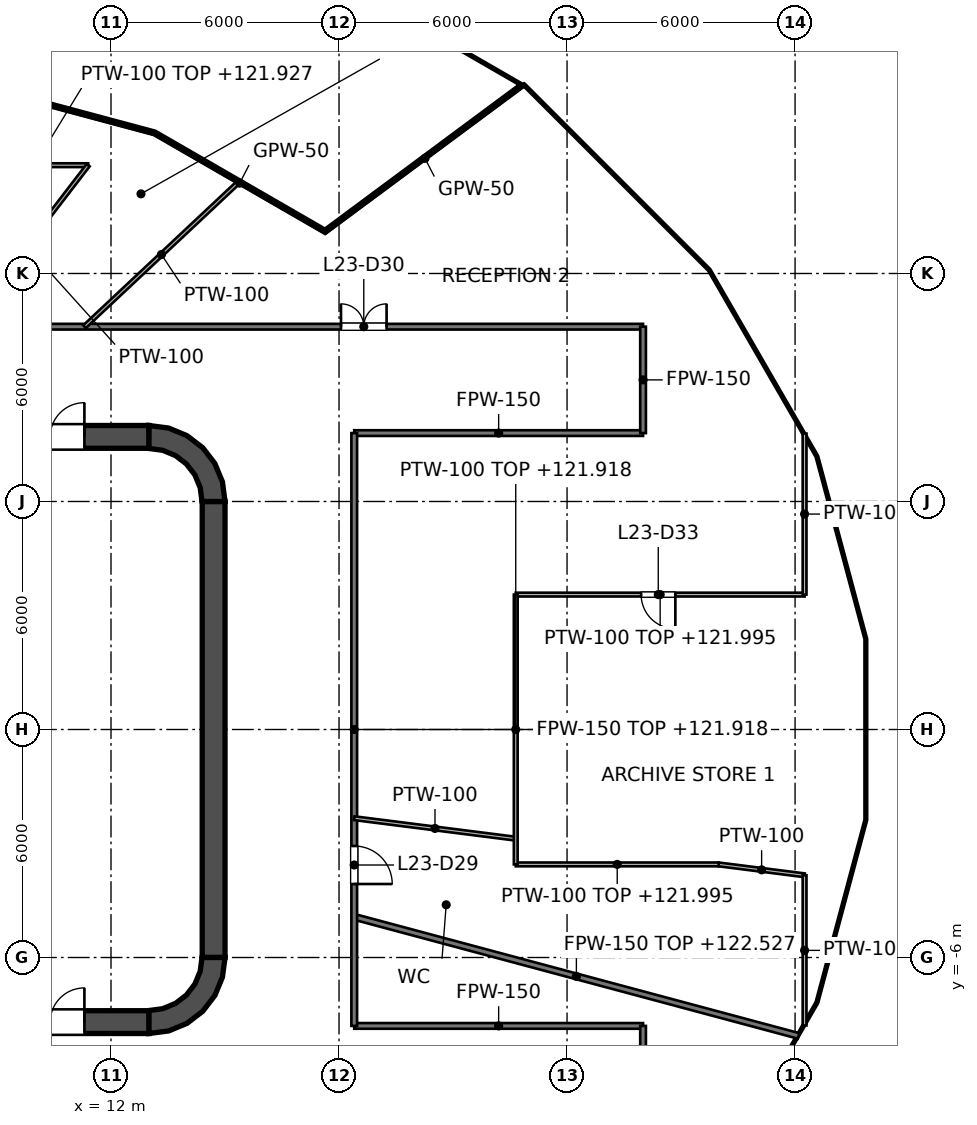
"""IFC4 building model, lengths in metres.
Left out: names, types, materials, properties, quantities, classifications, styles, units other than length and angle.
Written with IfcOpenShell. Run it as: python <this file> out.ifc"""

import sys

from ifc_helpers import new_model, si_unit, direction, frame, frame_2d, origin, place, context, subcontext, project, spatial, polyline, rectangle, outline, extrude, element, fill, save


model = new_model("IFC4")
c1 = context("Model", 3, precision=1e-05, world=origin(), true_north=direction((0.0, 1.0)))
c2 = subcontext(c1, "Body", "Model", "MODEL_VIEW")
j1 = project(units=[si_unit("LENGTHUNIT", "METRE"), si_unit("PLANEANGLEUNIT", "RADIAN")], contexts=[c1])
p1 = place(None, origin())
s1 = spatial("IfcSite", under=j1, at=p1, CompositionType="ELEMENT")
p2 = place(p1, origin())
s2 = spatial("IfcBuilding", under=s1, at=p2, CompositionType="ELEMENT")
p3 = place(p2, frame((0.0, 0.0, 118.8)))
s3 = spatial("IfcBuildingStorey", under=s2, at=p3, CompositionType="ELEMENT", Elevation=118.8)
p4 = place(p3, frame((-13.0, 7.7, 0.0), z_axis=(0.0, 0.0, 1.0), x_axis=(1.0, 0.0, 0.0)))
e1 = element("IfcWall", 1, at=p4, inside=s3, PredefinedType="SHEAR", context=c2, shape_type="SweptSolid", body=[
    extrude(rectangle(XDim=26.0, YDim=0.6, at=frame_2d((13.0, 0.0))), origin(), (0.0, 0.0, 1.0), 4.2),
])
p5 = place(p4, frame((1.7, 0.0, 0.0)))
e2 = element("IfcOpeningElement", 2, at=p5, cuts=e1, PredefinedType="OPENING", context=c2, shape_type="SweptSolid", body=[
    extrude(rectangle(XDim=1.8, YDim=2.1, at=frame_2d((0.9, 1.05))), frame((0.0, 0.3, 0.0), z_axis=(0.0, -1.0, 0.0), x_axis=(1.0, 0.0, 0.0)), (0.0, 0.0, 1.0), 0.6),
])
p6 = place(p4, frame((22.5, 0.0, 0.0)))
e3 = element("IfcOpeningElement", 3, at=p6, cuts=e1, PredefinedType="OPENING", context=c2, shape_type="SweptSolid", body=[
    extrude(rectangle(XDim=1.8, YDim=2.1, at=frame_2d((0.9, 1.05))), frame((0.0, 0.3, 0.0), z_axis=(0.0, -1.0, 0.0), x_axis=(1.0, 0.0, 0.0)), (0.0, 0.0, 1.0), 0.6),
])
p7 = place(p3, frame((-13.0, -7.7, 0.0), z_axis=(0.0, 0.0, 1.0), x_axis=(1.0, 0.0, 0.0)))
e4 = element("IfcWall", 4, at=p7, inside=s3, PredefinedType="SHEAR", context=c2, shape_type="SweptSolid", body=[
    extrude(rectangle(XDim=26.0, YDim=0.6, at=frame_2d((13.0, 0.0))), origin(), (0.0, 0.0, 1.0), 4.2),
])
p8 = place(p7, frame((1.7, 0.0, 0.0)))
e5 = element("IfcOpeningElement", 5, at=p8, cuts=e4, PredefinedType="OPENING", context=c2, shape_type="SweptSolid", body=[
    extrude(rectangle(XDim=1.8, YDim=2.1, at=frame_2d((0.9, 1.05))), frame((0.0, 0.3, 0.0), z_axis=(0.0, -1.0, 0.0), x_axis=(1.0, 0.0, 0.0)), (0.0, 0.0, 1.0), 0.6),
])
p9 = place(p7, frame((22.5, 0.0, 0.0)))
e6 = element("IfcOpeningElement", 6, at=p9, cuts=e4, PredefinedType="OPENING", context=c2, shape_type="SweptSolid", body=[
    extrude(rectangle(XDim=1.8, YDim=2.1, at=frame_2d((0.9, 1.05))), frame((0.0, 0.3, 0.0), z_axis=(0.0, -1.0, 0.0), x_axis=(1.0, 0.0, 0.0)), (0.0, 0.0, 1.0), 0.6),
])
p10 = place(p3, frame((14.7, -6.0, 0.0), z_axis=(0.0, 0.0, 1.0), x_axis=(0.0, 1.0, 0.0)))
e7 = element("IfcWall", 7, at=p10, inside=s3, PredefinedType="SHEAR", context=c2, shape_type="SweptSolid", body=[
    extrude(rectangle(XDim=12.0, YDim=0.6, at=frame_2d((6.0, 0.0))), origin(), (0.0, 0.0, 1.0), 4.2),
])
p11 = place(p3, origin())
e8 = element("IfcWall", 8, at=p11, inside=s3, PredefinedType="SHEAR", context=c2, shape_type="SweptSolid", body=[
    extrude(outline(polyline([(13.0, 8.0), (13.0, 7.395), (13.361, 7.347), (13.698, 7.208), (13.986, 6.986), (14.208, 6.698), (14.347, 6.361), (14.395, 6.0), (15.0, 6.0), (14.932, 6.518), (14.732, 7.0), (14.414, 7.414), (14.0, 7.732), (13.518, 7.932), (13.0, 8.0)])), origin(), (0.0, 0.0, 1.0), 4.2),
])
e9 = element("IfcWall", 9, at=p11, inside=s3, PredefinedType="SHEAR", context=c2, shape_type="SweptSolid", body=[
    extrude(outline(polyline([(15.0, -6.0), (14.395, -6.0), (14.347, -6.361), (14.208, -6.698), (13.986, -6.986), (13.698, -7.208), (13.361, -7.347), (13.0, -7.395), (13.0, -8.0), (13.518, -7.932), (14.0, -7.732), (14.414, -7.414), (14.732, -7.0), (14.932, -6.518), (15.0, -6.0)])), origin(), (0.0, 0.0, 1.0), 4.2),
])
p12 = place(p3, frame((11.8, -7.4, 0.0), z_axis=(0.0, 0.0, 1.0), x_axis=(0.0, 1.0, 0.0)))
e10 = element("IfcWall", 10, at=p12, inside=s3, PredefinedType="SOLIDWALL", context=c2, shape_type="SweptSolid", body=[
    extrude(rectangle(XDim=14.8, YDim=0.4, at=frame_2d((7.4, 0.0))), origin(), (0.0, 0.0, 1.0), 4.05),
])
p13 = place(p12, frame((11.2, 0.0, 0.0)))
e11 = element("IfcOpeningElement", 11, at=p13, cuts=e10, PredefinedType="OPENING", context=c2, shape_type="SweptSolid", body=[
    extrude(rectangle(XDim=1.1, YDim=2.1, at=frame_2d((0.55, 1.05))), frame((0.0, 0.2, 0.0), z_axis=(0.0, -1.0, 0.0), x_axis=(1.0, 0.0, 0.0)), (0.0, 0.0, 1.0), 0.4),
])
p14 = place(p12, frame((8.3, 0.0, 0.0)))
e12 = element("IfcOpeningElement", 12, at=p14, cuts=e10, PredefinedType="OPENING", context=c2, shape_type="SweptSolid", body=[
    extrude(rectangle(XDim=1.1, YDim=2.1, at=frame_2d((0.55, 1.05))), frame((0.0, 0.2, 0.0), z_axis=(0.0, -1.0, 0.0), x_axis=(1.0, 0.0, 0.0)), (0.0, 0.0, 1.0), 0.4),
])
p15 = place(p12, frame((5.4, 0.0, 0.0)))
e13 = element("IfcOpeningElement", 13, at=p15, cuts=e10, PredefinedType="OPENING", context=c2, shape_type="SweptSolid", body=[
    extrude(rectangle(XDim=1.1, YDim=2.1, at=frame_2d((0.55, 1.05))), frame((0.0, 0.2, 0.0), z_axis=(0.0, -1.0, 0.0), x_axis=(1.0, 0.0, 0.0)), (0.0, 0.0, 1.0), 0.4),
])
p16 = place(p12, frame((13.552, 0.0, 0.0)))
e14 = element("IfcOpeningElement", 14, at=p16, cuts=e10, PredefinedType="OPENING", context=c2, shape_type="SweptSolid", body=[
    extrude(rectangle(XDim=0.9, YDim=2.1, at=frame_2d((0.45, 1.05))), frame((0.0, 0.2, 0.0), z_axis=(0.0, -1.0, 0.0), x_axis=(1.0, 0.0, 0.0)), (0.0, 0.0, 1.0), 0.4),
])
p17 = place(p12, frame((0.347, 0.0, 0.0)))
e15 = element("IfcOpeningElement", 15, at=p17, cuts=e10, PredefinedType="OPENING", context=c2, shape_type="SweptSolid", body=[
    extrude(rectangle(XDim=0.9, YDim=2.1, at=frame_2d((0.45, 1.05))), frame((0.0, 0.2, 0.0), z_axis=(0.0, -1.0, 0.0), x_axis=(1.0, 0.0, 0.0)), (0.0, 0.0, 1.0), 0.4),
])
e16 = element("IfcWall", 16, at=p11, inside=s3, PredefinedType="SOLIDWALL", context=c2, shape_type="SweptSolid", body=[
    extrude(outline(polyline([(12.0, -5.675), (12.0, -5.925), (14.15, -5.925), (14.4, -5.925), (14.4, -5.675), (14.4, -3.025), (14.4, -2.775), (14.4, -0.125), (14.4, 0.125), (14.4, 2.775), (14.4, 3.025), (14.4, 5.675), (14.4, 5.925), (14.15, 5.925), (12.0, 5.925), (12.0, 5.675), (14.15, 5.675), (14.15, 3.025), (12.0, 3.025), (12.0, 2.775), (14.15, 2.775), (14.15, 0.125), (12.0, 0.125), (12.0, -0.125), (14.15, -0.125), (14.15, -2.775), (12.0, -2.775), (12.0, -3.025), (14.15, -3.025), (14.15, -5.675), (12.0, -5.675)])), origin(), (0.0, 0.0, 1.0), 4.05),
])
p18 = place(p3, frame((18.4, -4.93, 0.0), z_axis=(0.0, 0.0, 1.0), x_axis=(0.965917167339, -0.258851358583, 0.0)))
e17 = element("IfcWall", 17, at=p18, inside=s3, PredefinedType="PARTITIONING", context=c2, shape_type="SweptSolid", body=[
    extrude(rectangle(XDim=12.104, YDim=0.15, at=frame_2d((6.052, 0.0))), origin(), (0.0, 0.0, 1.0), 3.727),
])
for number, where, z_axis, x_axis in (
    (18, (18.4, -7.8, 0.0), (0.0, 0.0, 1.0), (1.0, 0.0, 0.0)),
    (19, (18.4, 7.8, 0.0), (0.0, 0.0, 1.0), (1.0, 0.0, 0.0)),
):
    element("IfcWall", number, at=place(p3, frame(where, z_axis=z_axis, x_axis=x_axis)), inside=s3, PredefinedType="PARTITIONING", context=c2, shape_type="SweptSolid", body=[
        extrude(rectangle(XDim=7.6, YDim=0.15, at=frame_2d((3.8, 0.0))), origin(), (0.0, 0.0, 1.0), 3.276),
    ])
p19 = place(p3, frame((-26.0, 10.6, 0.0), z_axis=(0.0, 0.0, 1.0), x_axis=(1.0, 0.0, 0.0)))
e20 = element("IfcWall", 20, at=p19, inside=s3, PredefinedType="PARTITIONING", context=c2, shape_type="SweptSolid", body=[
    extrude(rectangle(XDim=52.0, YDim=0.15, at=frame_2d((26.0, 0.0))), origin(), (0.0, 0.0, 1.0), 3.127),
])
p20 = place(p19, frame((44.052, 0.0, 0.0)))
e21 = element("IfcOpeningElement", 21, at=p20, cuts=e20, PredefinedType="OPENING", context=c2, shape_type="SweptSolid", body=[
    extrude(rectangle(XDim=1.2, YDim=2.1, at=frame_2d((0.6, 1.05))), frame((0.0, 0.075, 0.0), z_axis=(0.0, -1.0, 0.0), x_axis=(1.0, 0.0, 0.0)), (0.0, 0.0, 1.0), 0.15),
])
p21 = place(p19, frame((35.166, 0.0, 0.0)))
e22 = element("IfcOpeningElement", 22, at=p21, cuts=e20, PredefinedType="OPENING", context=c2, shape_type="SweptSolid", body=[
    extrude(rectangle(XDim=1.0, YDim=2.1, at=frame_2d((0.5, 1.05))), frame((0.0, 0.075, 0.0), z_axis=(0.0, -1.0, 0.0), x_axis=(1.0, 0.0, 0.0)), (0.0, 0.0, 1.0), 0.15),
])
p22 = place(p19, frame((32.68, 0.0, 0.0)))
e23 = element("IfcOpeningElement", 23, at=p22, cuts=e20, PredefinedType="OPENING", context=c2, shape_type="SweptSolid", body=[
    extrude(rectangle(XDim=1.0, YDim=2.1, at=frame_2d((0.5, 1.05))), frame((0.0, 0.075, 0.0), z_axis=(0.0, -1.0, 0.0), x_axis=(1.0, 0.0, 0.0)), (0.0, 0.0, 1.0), 0.15),
])
p23 = place(p19, frame((28.51, 0.0, 0.0)))
e24 = element("IfcOpeningElement", 24, at=p23, cuts=e20, PredefinedType="OPENING", context=c2, shape_type="SweptSolid", body=[
    extrude(rectangle(XDim=1.0, YDim=2.1, at=frame_2d((0.5, 1.05))), frame((0.0, 0.075, 0.0), z_axis=(0.0, -1.0, 0.0), x_axis=(1.0, 0.0, 0.0)), (0.0, 0.0, 1.0), 0.15),
])
p24 = place(p19, frame((22.49, 0.0, 0.0)))
e25 = element("IfcOpeningElement", 25, at=p24, cuts=e20, PredefinedType="OPENING", context=c2, shape_type="SweptSolid", body=[
    extrude(rectangle(XDim=1.0, YDim=2.1, at=frame_2d((0.5, 1.05))), frame((0.0, 0.075, 0.0), z_axis=(0.0, -1.0, 0.0), x_axis=(1.0, 0.0, 0.0)), (0.0, 0.0, 1.0), 0.15),
])
p25 = place(p19, frame((16.554, 0.0, 0.0)))
e26 = element("IfcOpeningElement", 26, at=p25, cuts=e20, PredefinedType="OPENING", context=c2, shape_type="SweptSolid", body=[
    extrude(rectangle(XDim=1.0, YDim=2.1, at=frame_2d((0.5, 1.05))), frame((0.0, 0.075, 0.0), z_axis=(0.0, -1.0, 0.0), x_axis=(1.0, 0.0, 0.0)), (0.0, 0.0, 1.0), 0.15),
])
p26 = place(p19, frame((6.614, 0.0, 0.0)))
e27 = element("IfcOpeningElement", 27, at=p26, cuts=e20, PredefinedType="OPENING", context=c2, shape_type="SweptSolid", body=[
    extrude(rectangle(XDim=1.0, YDim=2.1, at=frame_2d((0.5, 1.05))), frame((0.0, 0.075, 0.0), z_axis=(0.0, -1.0, 0.0), x_axis=(1.0, 0.0, 0.0)), (0.0, 0.0, 1.0), 0.15),
])
for number, where, z_axis, x_axis in (
    (28, (26.0, -10.6, 0.0), (0.0, 0.0, 1.0), (0.0, 1.0, 0.0)),
    (29, (26.0, 7.8, 0.0), (0.0, 0.0, 1.0), (0.0, 1.0, 0.0)),
):
    element("IfcWall", number, at=place(p3, frame(where, z_axis=z_axis, x_axis=x_axis)), inside=s3, PredefinedType="PARTITIONING", context=c2, shape_type="SweptSolid", body=[
        extrude(rectangle(XDim=2.8, YDim=0.15, at=frame_2d((1.4, 0.0))), origin(), (0.0, 0.0, 1.0), 3.276),
    ])
p27 = place(p3, frame((18.4, -7.8, 0.0), z_axis=(0.0, 0.0, 1.0), x_axis=(0.0, 1.0, 0.0)))
e30 = element("IfcWall", 30, at=p27, inside=s3, PredefinedType="PARTITIONING", context=c2, shape_type="SweptSolid", body=[
    extrude(rectangle(XDim=15.6, YDim=0.15, at=frame_2d((7.8, 0.0))), origin(), (0.0, 0.0, 1.0), 3.118),
])
p28 = place(p27, frame((3.734, 0.0, 0.0)))
e31 = element("IfcOpeningElement", 31, at=p28, cuts=e30, PredefinedType="OPENING", context=c2, shape_type="SweptSolid", body=[
    extrude(rectangle(XDim=1.0, YDim=2.1, at=frame_2d((0.5, 1.05))), frame((0.0, 0.075, 0.0), z_axis=(0.0, -1.0, 0.0), x_axis=(1.0, 0.0, 0.0)), (0.0, 0.0, 1.0), 0.15),
])
p29 = place(p3, frame((13.138, 15.676, 0.0), z_axis=(0.0, 0.0, 1.0), x_axis=(0.866061884255, -0.499936808647, 0.0)))
e32 = element("IfcWall", 32, at=p29, inside=s3, PredefinedType="PARTITIONING", context=c2, shape_type="SweptSolid", body=[
    extrude(rectangle(XDim=5.193, YDim=0.05, at=frame_2d((2.596, 0.0))), origin(), (0.0, 0.0, 1.0), 3.127),
])
p30 = place(p3, frame((4.73, 17.929, 0.0), z_axis=(0.0, 0.0, 1.0), x_axis=(0.96591812857, -0.258847771671, 0.0)))
e33 = element("IfcWall", 33, at=p30, inside=s3, PredefinedType="PARTITIONING", context=c2, shape_type="SweptSolid", body=[
    extrude(rectangle(XDim=8.705, YDim=0.05, at=frame_2d((4.352, 0.0))), origin(), (0.0, 0.0, 1.0), 3.127),
])
p31 = place(p3, frame((17.635, 13.08, 0.0), z_axis=(0.0, 0.0, 1.0), x_axis=(0.803142977869, 0.595786335107, 0.0)))
e34 = element("IfcWall", 34, at=p31, inside=s3, PredefinedType="PARTITIONING", context=c2, shape_type="SweptSolid", body=[
    extrude(rectangle(XDim=6.539, YDim=0.05, at=frame_2d((3.27, 0.0))), origin(), (0.0, 0.0, 1.0), 3.127),
])
p32 = place(p3, frame((18.4, -2.334, 0.0), z_axis=(0.0, 0.0, 1.0), x_axis=(0.992044690644, -0.125886185756, 0.0)))
e35 = element("IfcWall", 35, at=p32, inside=s3, PredefinedType="PARTITIONING", context=c2, shape_type="SweptSolid", body=[
    extrude(rectangle(XDim=4.284, YDim=0.1, at=frame_2d((2.142, 0.0))), origin(), (0.0, 0.0, 1.0), 4.05),
])
p33 = place(p3, frame((27.99, -3.55, 0.0), z_axis=(0.0, 0.0, 1.0), x_axis=(0.992040317819, -0.125920640968, 0.0)))
e36 = element("IfcWall", 36, at=p33, inside=s3, PredefinedType="PARTITIONING", context=c2, shape_type="SweptSolid", body=[
    extrude(rectangle(XDim=2.278, YDim=0.1, at=frame_2d((1.139, 0.0))), origin(), (0.0, 0.0, 1.0), 4.05),
])
p34 = place(p3, frame((22.65, -3.55, 0.0), z_axis=(0.0, 0.0, 1.0), x_axis=(1.0, 0.0, 0.0)))
e37 = element("IfcWall", 37, at=p34, inside=s3, PredefinedType="PARTITIONING", context=c2, shape_type="SweptSolid", body=[
    extrude(rectangle(XDim=5.34, YDim=0.1, at=frame_2d((2.67, 0.0))), origin(), (0.0, 0.0, 1.0), 3.195),
])
p35 = place(p3, frame((22.65, 3.55, 0.0), z_axis=(0.0, 0.0, 1.0), x_axis=(1.0, 0.0, 0.0)))
e38 = element("IfcWall", 38, at=p35, inside=s3, PredefinedType="PARTITIONING", context=c2, shape_type="SweptSolid", body=[
    extrude(rectangle(XDim=7.6, YDim=0.1, at=frame_2d((3.8, 0.0))), origin(), (0.0, 0.0, 1.0), 3.195),
])
p36 = place(p35, frame((3.3, 0.0, 0.0)))
e39 = element("IfcOpeningElement", 39, at=p36, cuts=e38, PredefinedType="OPENING", context=c2, shape_type="SweptSolid", body=[
    extrude(rectangle(XDim=0.9, YDim=2.1, at=frame_2d((0.45, 1.05))), frame((0.0, 0.05, 0.0), z_axis=(0.0, -1.0, 0.0), x_axis=(1.0, 0.0, 0.0)), (0.0, 0.0, 1.0), 0.1),
])
p37 = place(p3, frame((8.573, 14.85, 0.0), z_axis=(0.0, 0.0, 1.0), x_axis=(1.0, 0.0, 0.0)))
e40 = element("IfcWall", 40, at=p37, inside=s3, PredefinedType="PARTITIONING", context=c2, shape_type="SweptSolid", body=[
    extrude(rectangle(XDim=2.826, YDim=0.1, at=frame_2d((1.413, 0.0))), origin(), (0.0, 0.0, 1.0), 3.127),
])
p38 = place(p3, frame((11.303, 10.6, 0.0), z_axis=(0.0, 0.0, 1.0), x_axis=(0.72937123746, 0.684118116969, 0.0)))
e41 = element("IfcWall", 41, at=p38, inside=s3, PredefinedType="PARTITIONING", context=c2, shape_type="SweptSolid", body=[
    extrude(rectangle(XDim=5.552, YDim=0.1, at=frame_2d((2.776, 0.0))), origin(), (0.0, 0.0, 1.0), 4.05),
])
p39 = place(p3, frame((8.137, 10.6, 0.0), z_axis=(0.0, 0.0, 1.0), x_axis=(0.608858134489, 0.793279126201, 0.0)))
e42 = element("IfcWall", 42, at=p39, inside=s3, PredefinedType="PARTITIONING", context=c2, shape_type="SweptSolid", body=[
    extrude(rectangle(XDim=5.357, YDim=0.1, at=frame_2d((2.679, 0.0))), origin(), (0.0, 0.0, 1.0), 4.05),
])
p40 = place(p3, frame((30.25, -7.788, 0.0), z_axis=(0.0, 0.0, 1.0), x_axis=(0.0, 1.0, 0.0)))
e43 = element("IfcWall", 43, at=p40, inside=s3, PredefinedType="PARTITIONING", context=c2, shape_type="SweptSolid", body=[
    extrude(rectangle(XDim=3.951, YDim=0.1, at=frame_2d((1.976, 0.0))), origin(), (0.0, 0.0, 1.0), 3.127),
])
p41 = place(p3, frame((30.25, 3.55, 0.0), z_axis=(0.0, 0.0, 1.0), x_axis=(0.0, 1.0, 0.0)))
e44 = element("IfcWall", 44, at=p41, inside=s3, PredefinedType="PARTITIONING", context=c2, shape_type="SweptSolid", body=[
    extrude(rectangle(XDim=4.238, YDim=0.1, at=frame_2d((2.119, 0.0))), origin(), (0.0, 0.0, 1.0), 3.127),
])
p42 = place(p3, frame((22.65, -3.55, 0.0), z_axis=(0.0, 0.0, 1.0), x_axis=(0.0, 1.0, 0.0)))
e45 = element("IfcWall", 45, at=p42, inside=s3, PredefinedType="PARTITIONING", context=c2, shape_type="SweptSolid", body=[
    extrude(rectangle(XDim=7.1, YDim=0.1, at=frame_2d((3.55, 0.0))), origin(), (0.0, 0.0, 1.0), 3.118),
])
p43 = place(p13, origin())
e46 = element("IfcDoor", 46, at=p43, inside=s3, OperationType="DOUBLE_DOOR_SLIDING", PredefinedType="DOOR", context=c2, shape_type="SweptSolid", body=[
    extrude(rectangle(XDim=1.1, YDim=2.1, at=frame_2d((0.55, 1.05))), frame((0.0, 0.025, 0.0), z_axis=(0.0, -1.0, 0.0), x_axis=(1.0, 0.0, 0.0)), (0.0, 0.0, 1.0), 0.05),
])
fill(e11, e46)
p44 = place(p14, origin())
e47 = element("IfcDoor", 47, at=p44, inside=s3, OperationType="DOUBLE_DOOR_SLIDING", PredefinedType="DOOR", context=c2, shape_type="SweptSolid", body=[
    extrude(rectangle(XDim=1.1, YDim=2.1, at=frame_2d((0.55, 1.05))), frame((0.0, 0.025, 0.0), z_axis=(0.0, -1.0, 0.0), x_axis=(1.0, 0.0, 0.0)), (0.0, 0.0, 1.0), 0.05),
])
fill(e12, e47)
p45 = place(p15, origin())
e48 = element("IfcDoor", 48, at=p45, inside=s3, OperationType="DOUBLE_DOOR_SLIDING", PredefinedType="DOOR", context=c2, shape_type="SweptSolid", body=[
    extrude(rectangle(XDim=1.1, YDim=2.1, at=frame_2d((0.55, 1.05))), frame((0.0, 0.025, 0.0), z_axis=(0.0, -1.0, 0.0), x_axis=(1.0, 0.0, 0.0)), (0.0, 0.0, 1.0), 0.05),
])
fill(e13, e48)
p46 = place(p16, origin())
e49 = element("IfcDoor", 49, at=p46, inside=s3, OperationType="SINGLE_SWING_RIGHT", PredefinedType="DOOR", context=c2, shape_type="SweptSolid", body=[
    extrude(rectangle(XDim=0.9, YDim=2.1, at=frame_2d((0.45, 1.05))), frame((0.0, 0.025, 0.0), z_axis=(0.0, -1.0, 0.0), x_axis=(1.0, 0.0, 0.0)), (0.0, 0.0, 1.0), 0.05),
])
fill(e14, e49)
p47 = place(p17, origin())
e50 = element("IfcDoor", 50, at=p47, inside=s3, OperationType="SINGLE_SWING_RIGHT", PredefinedType="DOOR", context=c2, shape_type="SweptSolid", body=[
    extrude(rectangle(XDim=0.9, YDim=2.1, at=frame_2d((0.45, 1.05))), frame((0.0, 0.025, 0.0), z_axis=(0.0, -1.0, 0.0), x_axis=(1.0, 0.0, 0.0)), (0.0, 0.0, 1.0), 0.05),
])
fill(e15, e50)
p48 = place(p6, origin())
e51 = element("IfcDoor", 51, at=p48, inside=s3, OperationType="DOUBLE_DOOR_SINGLE_SWING", PredefinedType="DOOR", context=c2, shape_type="SweptSolid", body=[
    extrude(rectangle(XDim=1.8, YDim=2.1, at=frame_2d((0.9, 1.05))), frame((0.0, 0.025, 0.0), z_axis=(0.0, -1.0, 0.0), x_axis=(1.0, 0.0, 0.0)), (0.0, 0.0, 1.0), 0.05),
])
fill(e3, e51)
p49 = place(p9, origin())
e52 = element("IfcDoor", 52, at=p49, inside=s3, OperationType="DOUBLE_DOOR_SINGLE_SWING", PredefinedType="DOOR", context=c2, shape_type="SweptSolid", body=[
    extrude(rectangle(XDim=1.8, YDim=2.1, at=frame_2d((0.9, 1.05))), frame((0.0, 0.025, 0.0), z_axis=(0.0, -1.0, 0.0), x_axis=(1.0, 0.0, 0.0)), (0.0, 0.0, 1.0), 0.05),
])
fill(e6, e52)
p50 = place(p28, origin())
e53 = element("IfcDoor", 53, at=p50, inside=s3, OperationType="SINGLE_SWING_LEFT", PredefinedType="DOOR", context=c2, shape_type="SweptSolid", body=[
    extrude(rectangle(XDim=1.0, YDim=2.1, at=frame_2d((0.5, 1.05))), frame((0.0, 0.025, 0.0), z_axis=(0.0, -1.0, 0.0), x_axis=(1.0, 0.0, 0.0)), (0.0, 0.0, 1.0), 0.05),
])
fill(e31, e53)
p51 = place(p20, origin())
e54 = element("IfcDoor", 54, at=p51, inside=s3, OperationType="DOUBLE_DOOR_SINGLE_SWING", PredefinedType="DOOR", context=c2, shape_type="SweptSolid", body=[
    extrude(rectangle(XDim=1.2, YDim=2.1, at=frame_2d((0.6, 1.05))), frame((0.0, 0.025, 0.0), z_axis=(0.0, -1.0, 0.0), x_axis=(1.0, 0.0, 0.0)), (0.0, 0.0, 1.0), 0.05),
])
fill(e21, e54)
p52 = place(p36, origin())
e55 = element("IfcDoor", 55, at=p52, inside=s3, OperationType="SINGLE_SWING_RIGHT", PredefinedType="DOOR", context=c2, shape_type="SweptSolid", body=[
    extrude(rectangle(XDim=0.9, YDim=2.1, at=frame_2d((0.45, 1.05))), frame((0.0, 0.025, 0.0), z_axis=(0.0, -1.0, 0.0), x_axis=(1.0, 0.0, 0.0)), (0.0, 0.0, 1.0), 0.05),
])
fill(e39, e55)
save(model, sys.argv[1])
